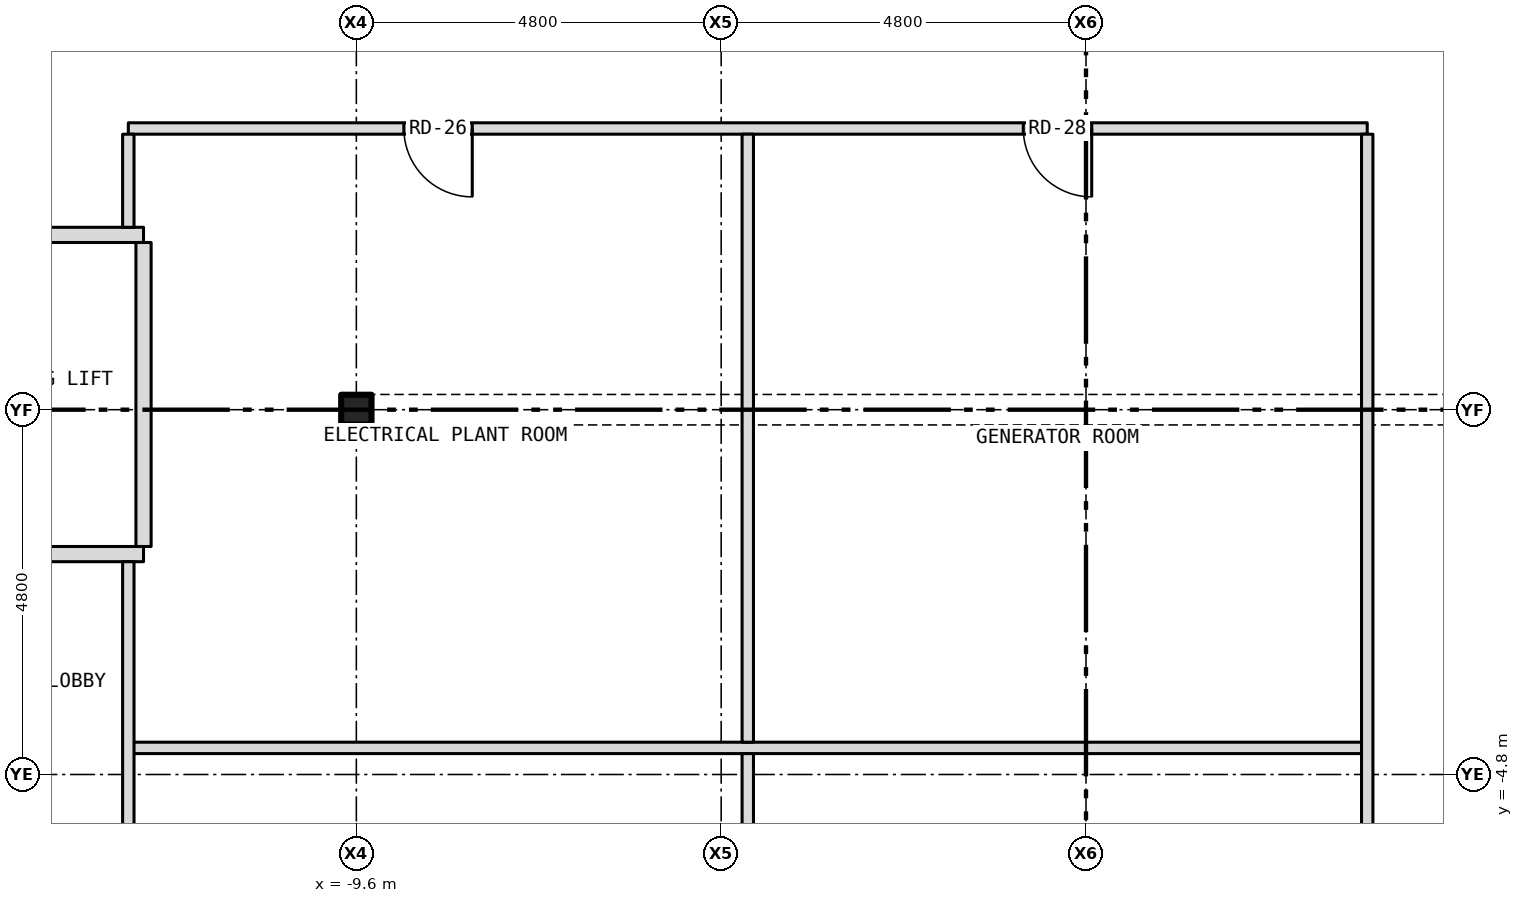
"""IFC4 building model, lengths in metres.
Left out: names, types, materials, properties, quantities, classifications, styles, units other than length and angle.
Written with IfcOpenShell. Run it as: python <this file> out.ifc"""

import sys

from ifc_helpers import new_model, si_unit, direction, frame, frame_2d, origin, origin_2d, place, context, subcontext, project, spatial, rectangle, i_section, extrude, element, fill, save


model = new_model("IFC4")
c1 = context("Model", 3, precision=1e-05, world=origin(), true_north=direction((0.0, 1.0)))
c2 = subcontext(c1, "Body", "Model", "MODEL_VIEW")
j1 = project(units=[si_unit("LENGTHUNIT", "METRE"), si_unit("PLANEANGLEUNIT", "RADIAN")], contexts=[c1])
p1 = place(None, origin())
s1 = spatial("IfcSite", under=j1, at=p1, CompositionType="ELEMENT")
p2 = place(p1, origin())
s2 = spatial("IfcBuilding", under=s1, at=p2, CompositionType="ELEMENT")
p3 = place(p2, frame((0.0, 0.0, 138.0)))
s3 = spatial("IfcBuildingStorey", under=s2, at=p3, CompositionType="ELEMENT", Elevation=138.0)
p4 = place(p3, frame((-9.6, 0.0, -0.3), z_axis=(0.0, 0.0, 1.0), x_axis=(1.0, 0.0, 0.0)))
e1 = element("IfcColumn", 1, at=p4, inside=s3, PredefinedType="COLUMN", context=c2, shape_type="SweptSolid", body=[
    extrude(i_section(OverallWidth=0.399, OverallDepth=0.394, WebThickness=0.023, FlangeThickness=0.037, at=origin_2d()), origin(), (0.0, 0.0, 1.0), 4.6),
])
p5 = place(p3, frame((-12.6, -4.45, 0.0), z_axis=(0.0, 0.0, 1.0), x_axis=(1.0, 0.0, 0.0)))
e2 = element("IfcWall", 2, at=p5, inside=s3, PredefinedType="PARTITIONING", context=c2, shape_type="SweptSolid", body=[
    extrude(rectangle(XDim=16.3, YDim=0.15, at=frame_2d((8.15, 0.0))), origin(), (0.0, 0.0, 1.0), 4.3),
])
p6 = place(p3, frame((-15.68, -1.9, 0.0), z_axis=(0.0, 0.0, 1.0), x_axis=(1.0, 0.0, 0.0)))
e3 = element("IfcWall", 3, at=p6, inside=s3, PredefinedType="PARTITIONING", context=c2, shape_type="SweptSolid", body=[
    extrude(rectangle(XDim=3.28, YDim=0.2, at=frame_2d((1.64, 0.0))), origin(), (0.0, 0.0, 1.0), 4.3),
])
p7 = place(p6, frame((0.94, 0.0, 0.0)))
e4 = element("IfcOpeningElement", 4, at=p7, cuts=e3, PredefinedType="OPENING", context=c2, shape_type="SweptSolid", body=[
    extrude(rectangle(XDim=1.1, YDim=2.1, at=frame_2d((0.55, 1.05))), frame((0.0, 0.112, 0.0), z_axis=(0.0, -1.0, 0.0), x_axis=(1.0, 0.0, 0.0)), (0.0, 0.0, 1.0), 0.224),
])
p8 = place(p3, frame((-15.68, 2.3, 0.0), z_axis=(0.0, 0.0, 1.0), x_axis=(1.0, 0.0, 0.0)))
e5 = element("IfcWall", 5, at=p8, inside=s3, PredefinedType="PARTITIONING", context=c2, shape_type="SweptSolid", body=[
    extrude(rectangle(XDim=3.28, YDim=0.2, at=frame_2d((1.64, 0.0))), origin(), (0.0, 0.0, 1.0), 4.3),
])
p9 = place(p8, frame((0.84, 0.0, 0.0)))
e6 = element("IfcOpeningElement", 6, at=p9, cuts=e5, PredefinedType="OPENING", context=c2, shape_type="SweptSolid", body=[
    extrude(rectangle(XDim=1.1, YDim=2.1, at=frame_2d((0.55, 1.05))), frame((0.0, 0.112, 0.0), z_axis=(0.0, -1.0, 0.0), x_axis=(1.0, 0.0, 0.0)), (0.0, 0.0, 1.0), 0.224),
])
p10 = place(p3, frame((-12.6, 3.7, 0.0), z_axis=(0.0, 0.0, 1.0), x_axis=(1.0, 0.0, 0.0)))
e7 = element("IfcWall", 7, at=p10, inside=s3, PredefinedType="PARTITIONING", context=c2, shape_type="SweptSolid", body=[
    extrude(rectangle(XDim=16.3, YDim=0.15, at=frame_2d((8.15, 0.0))), origin(), (0.0, 0.0, 1.0), 4.3),
])
p11 = place(p10, frame((3.625, 0.0, 0.0)))
e8 = element("IfcOpeningElement", 8, at=p11, cuts=e7, PredefinedType="OPENING", context=c2, shape_type="SweptSolid", body=[
    extrude(rectangle(XDim=0.9, YDim=2.1, at=frame_2d((0.45, 1.05))), frame((0.0, 0.087, 0.0), z_axis=(0.0, -1.0, 0.0), x_axis=(1.0, 0.0, 0.0)), (0.0, 0.0, 1.0), 0.174),
])
p12 = place(p10, frame((11.775, 0.0, 0.0)))
e9 = element("IfcOpeningElement", 9, at=p12, cuts=e7, PredefinedType="OPENING", context=c2, shape_type="SweptSolid", body=[
    extrude(rectangle(XDim=0.9, YDim=2.1, at=frame_2d((0.45, 1.05))), frame((0.0, 0.087, 0.0), z_axis=(0.0, -1.0, 0.0), x_axis=(1.0, 0.0, 0.0)), (0.0, 0.0, 1.0), 0.174),
])
p13 = place(p3, frame((-12.6, -12.525, 0.0), z_axis=(0.0, 0.0, 1.0), x_axis=(0.0, 1.0, 0.0)))
e10 = element("IfcWall", 10, at=p13, inside=s3, PredefinedType="PARTITIONING", context=c2, shape_type="SweptSolid", body=[
    extrude(rectangle(XDim=10.525, YDim=0.15, at=frame_2d((5.262, 0.0))), origin(), (0.0, 0.0, 1.0), 4.3),
])
p14 = place(p3, frame((-12.6, 2.4, 0.0), z_axis=(0.0, 0.0, 1.0), x_axis=(0.0, 1.0, 0.0)))
e11 = element("IfcWall", 11, at=p14, inside=s3, PredefinedType="PARTITIONING", context=c2, shape_type="SweptSolid", body=[
    extrude(rectangle(XDim=1.225, YDim=0.15, at=frame_2d((0.613, 0.0))), origin(), (0.0, 0.0, 1.0), 4.3),
])
p15 = place(p3, frame((-12.4, -1.8, 0.0), z_axis=(0.0, 0.0, 1.0), x_axis=(0.0, 1.0, 0.0)))
e12 = element("IfcWall", 12, at=p15, inside=s3, PredefinedType="PARTITIONING", context=c2, shape_type="SweptSolid", body=[
    extrude(rectangle(XDim=4.0, YDim=0.2, at=frame_2d((2.0, 0.0))), origin(), (0.0, 0.0, 1.0), 4.3),
])
for number, where, z_axis, x_axis in (
    (13, (-4.45, -12.525, 0.0), (0.0, 0.0, 1.0), (0.0, 1.0, 0.0)),
    (14, (-4.45, -4.375, 0.0), (0.0, 0.0, 1.0), (0.0, 1.0, 0.0)),
):
    element("IfcWall", number, at=place(p3, frame(where, z_axis=z_axis, x_axis=x_axis)), inside=s3, PredefinedType="PARTITIONING", context=c2, shape_type="SweptSolid", body=[
        extrude(rectangle(XDim=8.0, YDim=0.15, at=frame_2d((4.0, 0.0))), origin(), (0.0, 0.0, 1.0), 4.3),
    ])
p16 = place(p3, frame((3.7, -12.525, 0.0), z_axis=(0.0, 0.0, 1.0), x_axis=(0.0, 1.0, 0.0)))
e15 = element("IfcWall", 15, at=p16, inside=s3, PredefinedType="PARTITIONING", context=c2, shape_type="SweptSolid", body=[
    extrude(rectangle(XDim=16.15, YDim=0.15, at=frame_2d((8.075, 0.0))), origin(), (0.0, 0.0, 1.0), 4.3),
])
p17 = place(p11, origin())
e16 = element("IfcDoor", 16, at=p17, inside=s3, OperationType="SINGLE_SWING_RIGHT", PredefinedType="DOOR", context=c2, shape_type="SweptSolid", body=[
    extrude(rectangle(XDim=0.9, YDim=2.1, at=frame_2d((0.45, 1.05))), frame((0.0, 0.025, 0.0), z_axis=(0.0, -1.0, 0.0), x_axis=(1.0, 0.0, 0.0)), (0.0, 0.0, 1.0), 0.05),
])
fill(e8, e16)
p18 = place(p12, origin())
e17 = element("IfcDoor", 17, at=p18, inside=s3, OperationType="SINGLE_SWING_RIGHT", PredefinedType="DOOR", context=c2, shape_type="SweptSolid", body=[
    extrude(rectangle(XDim=0.9, YDim=2.1, at=frame_2d((0.45, 1.05))), frame((0.0, 0.025, 0.0), z_axis=(0.0, -1.0, 0.0), x_axis=(1.0, 0.0, 0.0)), (0.0, 0.0, 1.0), 0.05),
])
fill(e9, e17)
save(model, sys.argv[1])
